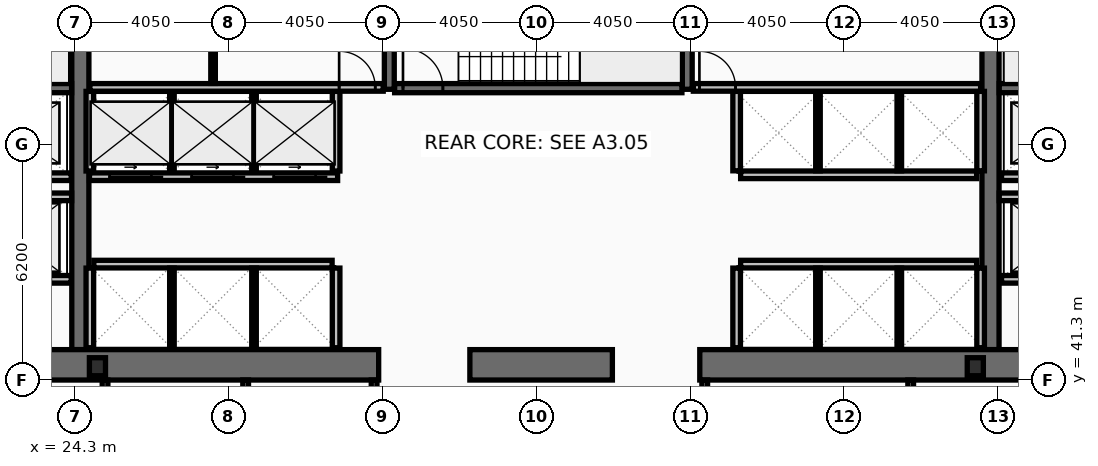
"""IFC4 building model, lengths in metres.
Left out: names, types, materials, properties, quantities, classifications, styles, units other than length and angle.
Written with IfcOpenShell. Run it as: python <this file> out.ifc"""

import sys

from ifc_helpers import new_model, si_unit, direction, frame, frame_2d, origin, origin_2d, place, context, subcontext, project, spatial, rectangle, i_section, extrude, element, fill, save


model = new_model("IFC4")
c1 = context("Model", 3, precision=1e-05, world=origin(), true_north=direction((0.0, 1.0)))
c2 = subcontext(c1, "Body", "Model", "MODEL_VIEW")
j1 = project(units=[si_unit("LENGTHUNIT", "METRE"), si_unit("PLANEANGLEUNIT", "RADIAN")], contexts=[c1])
p1 = place(None, origin())
s1 = spatial("IfcSite", under=j1, at=p1, CompositionType="ELEMENT")
p2 = place(p1, origin())
s2 = spatial("IfcBuilding", under=s1, at=p2, CompositionType="ELEMENT")
p3 = place(p2, frame((0.0, 0.0, 49.8)))
s3 = spatial("IfcBuildingStorey", under=s2, at=p3, CompositionType="ELEMENT", Elevation=49.8)
for number, where, z_axis, x_axis in (
    (1, (24.45, 42.1, 0.0), (0.0, 0.0, 1.0), (0.0, 1.0, 0.0)),
    (2, (48.4, 42.1, 0.0), (0.0, 0.0, 1.0), (0.0, 1.0, 0.0)),
):
    element("IfcWall", number, at=place(p3, frame(where, z_axis=z_axis, x_axis=x_axis)), inside=s3, PredefinedType="SHEAR", context=c2, shape_type="SweptSolid", body=[
        extrude(rectangle(XDim=10.8, YDim=0.45, at=frame_2d((5.4, 0.0))), origin(), (0.0, 0.0, 1.0), 3.82),
    ])
p4 = place(p3, frame((32.3, 41.7, 0.0), z_axis=(0.0, 0.0, 1.0), x_axis=(-1.0, 0.0, 0.0)))
e3 = element("IfcWall", 3, at=p4, inside=s3, PredefinedType="SHEAR", context=c2, shape_type="SweptSolid", body=[
    extrude(rectangle(XDim=11.45, YDim=0.8, at=frame_2d((5.725, 0.0))), origin(), (0.0, 0.0, 1.0), 3.82),
])
p5 = place(p3, frame((38.45, 41.7, 0.0), z_axis=(0.0, 0.0, 1.0), x_axis=(-1.0, 0.0, 0.0)))
e4 = element("IfcWall", 4, at=p5, inside=s3, PredefinedType="SHEAR", context=c2, shape_type="SweptSolid", body=[
    extrude(rectangle(XDim=3.75, YDim=0.8, at=frame_2d((1.875, 0.0))), origin(), (0.0, 0.0, 1.0), 3.82),
])
p6 = place(p3, frame((52.05, 41.7, 0.0), z_axis=(0.0, 0.0, 1.0), x_axis=(-1.0, 0.0, 0.0)))
e5 = element("IfcWall", 5, at=p6, inside=s3, PredefinedType="SHEAR", context=c2, shape_type="SweptSolid", body=[
    extrude(rectangle(XDim=11.3, YDim=0.8, at=frame_2d((5.65, 0.0))), origin(), (0.0, 0.0, 1.0), 3.82),
])
for number, where, z_axis, x_axis in (
    (6, (32.58, 48.95, 0.0), (0.0, 0.0, 1.0), (0.0, 1.0, 0.0)),
    (7, (40.42, 48.95, 0.0), (0.0, 0.0, 1.0), (0.0, 1.0, 0.0)),
):
    element("IfcWall", number, at=place(p3, frame(where, z_axis=z_axis, x_axis=x_axis)), inside=s3, PredefinedType="SHEAR", context=c2, shape_type="SweptSolid", body=[
        extrude(rectangle(XDim=3.95, YDim=0.26, at=frame_2d((1.975, 0.0))), origin(), (0.0, 0.0, 1.0), 3.82),
    ])
p7 = place(p3, frame((17.0, 48.98, 0.0), z_axis=(0.0, 0.0, 1.0), x_axis=(1.0, 0.0, 0.0)))
e8 = element("IfcWall", 8, at=p7, inside=s3, PredefinedType="SHEAR", context=c2, shape_type="SweptSolid", body=[
    extrude(rectangle(XDim=7.22, YDim=0.24, at=frame_2d((3.61, 0.0))), origin(), (0.0, 0.0, 1.0), 3.82),
])
p8 = place(p7, frame((0.22, 0.0, 0.0)))
e9 = element("IfcOpeningElement", 9, at=p8, cuts=e8, PredefinedType="OPENING", context=c2, shape_type="SweptSolid", body=[
    extrude(rectangle(XDim=1.05, YDim=2.15, at=frame_2d((0.525, 1.075))), frame((0.0, 0.13, 0.0), z_axis=(0.0, -1.0, 0.0), x_axis=(1.0, 0.0, 0.0)), (0.0, 0.0, 1.0), 0.26),
])
p9 = place(p3, frame((48.63, 48.98, 0.0), z_axis=(0.0, 0.0, 1.0), x_axis=(1.0, 0.0, 0.0)))
e10 = element("IfcWall", 10, at=p9, inside=s3, PredefinedType="SHEAR", context=c2, shape_type="SweptSolid", body=[
    extrude(rectangle(XDim=7.27, YDim=0.24, at=frame_2d((3.635, 0.0))), origin(), (0.0, 0.0, 1.0), 3.82),
])
p10 = place(p9, frame((6.0, 0.0, 0.0)))
e11 = element("IfcOpeningElement", 11, at=p10, cuts=e10, PredefinedType="OPENING", context=c2, shape_type="SweptSolid", body=[
    extrude(rectangle(XDim=1.05, YDim=2.15, at=frame_2d((0.525, 1.075))), frame((0.0, 0.13, 0.0), z_axis=(0.0, -1.0, 0.0), x_axis=(1.0, 0.0, 0.0)), (0.0, 0.0, 1.0), 0.26),
])
p11 = place(p3, frame((32.72, 48.98, 0.0), z_axis=(0.0, 0.0, 1.0), x_axis=(1.0, 0.0, 0.0)))
e12 = element("IfcWall", 12, at=p11, inside=s3, PredefinedType="SHEAR", context=c2, shape_type="SweptSolid", body=[
    extrude(rectangle(XDim=7.56, YDim=0.24, at=frame_2d((3.78, 0.0))), origin(), (0.0, 0.0, 1.0), 3.82),
])
p12 = place(p11, frame((0.22, 0.0, 0.0)))
e13 = element("IfcOpeningElement", 13, at=p12, cuts=e12, PredefinedType="OPENING", context=c2, shape_type="SweptSolid", body=[
    extrude(rectangle(XDim=1.05, YDim=2.15, at=frame_2d((0.525, 1.075))), frame((0.0, 0.13, 0.0), z_axis=(0.0, -1.0, 0.0), x_axis=(1.0, 0.0, 0.0)), (0.0, 0.0, 1.0), 0.26),
])
for number, where, z_axis, x_axis in (
    (14, (24.9, 41.65, 0.0), (0.0, 0.0, 1.0), (1.0, 0.0, 0.0)),
    (15, (48.0, 41.65, 0.0), (0.0, 0.0, 1.0), (1.0, 0.0, 0.0)),
):
    element("IfcColumn", number, at=place(p3, frame(where, z_axis=z_axis, x_axis=x_axis)), inside=s3, PredefinedType="COLUMN", context=c2, shape_type="SweptSolid", body=[
        extrude(i_section(OverallWidth=0.424, OverallDepth=0.474, WebThickness=0.048, FlangeThickness=0.077, at=origin_2d()), origin(), (0.0, 0.0, 1.0), 4.0),
    ])
p13 = place(p3, frame((51.61, 43.95, 0.0), z_axis=(0.0, 0.0, 1.0), x_axis=(-1.0, 0.0, 0.0)))
e16 = element("IfcWall", 16, at=p13, inside=s3, PredefinedType="PARTITIONING", context=c2, shape_type="SweptSolid", body=[
    extrude(rectangle(XDim=2.92, YDim=0.2, at=frame_2d((1.46, 0.0))), origin(), (0.0, 0.0, 1.0), 3.82),
])
p14 = place(p13, frame((0.81, 0.0, 0.0)))
e17 = element("IfcOpeningElement", 17, at=p14, cuts=e16, PredefinedType="OPENING", context=c2, shape_type="SweptSolid", body=[
    extrude(rectangle(XDim=1.3, YDim=2.18, at=frame_2d((0.65, 1.09))), frame((0.0, 0.11, 0.0), z_axis=(0.0, -1.0, 0.0), x_axis=(1.0, 0.0, 0.0)), (0.0, 0.0, 1.0), 0.22),
])
p15 = place(p3, frame((24.21, 43.95, 0.0), z_axis=(0.0, 0.0, 1.0), x_axis=(-1.0, 0.0, 0.0)))
e18 = element("IfcWall", 18, at=p15, inside=s3, PredefinedType="PARTITIONING", context=c2, shape_type="SweptSolid", body=[
    extrude(rectangle(XDim=2.97, YDim=0.2, at=frame_2d((1.485, 0.0))), origin(), (0.0, 0.0, 1.0), 3.82),
])
p16 = place(p15, frame((0.86, 0.0, 0.0)))
e19 = element("IfcOpeningElement", 19, at=p16, cuts=e18, PredefinedType="OPENING", context=c2, shape_type="SweptSolid", body=[
    extrude(rectangle(XDim=1.3, YDim=2.18, at=frame_2d((0.65, 1.09))), frame((0.0, 0.11, 0.0), z_axis=(0.0, -1.0, 0.0), x_axis=(1.0, 0.0, 0.0)), (0.0, 0.0, 1.0), 0.22),
])
p17 = place(p3, frame((51.61, 46.65, 0.0), z_axis=(0.0, 0.0, 1.0), x_axis=(-1.0, 0.0, 0.0)))
e20 = element("IfcWall", 20, at=p17, inside=s3, PredefinedType="PARTITIONING", context=c2, shape_type="SweptSolid", body=[
    extrude(rectangle(XDim=2.92, YDim=0.2, at=frame_2d((1.46, 0.0))), origin(), (0.0, 0.0, 1.0), 3.82),
])
p18 = place(p17, frame((0.86, 0.0, 0.0)))
e21 = element("IfcOpeningElement", 21, at=p18, cuts=e20, PredefinedType="OPENING", context=c2, shape_type="SweptSolid", body=[
    extrude(rectangle(XDim=1.2, YDim=2.18, at=frame_2d((0.6, 1.09))), frame((0.0, 0.11, 0.0), z_axis=(0.0, -1.0, 0.0), x_axis=(1.0, 0.0, 0.0)), (0.0, 0.0, 1.0), 0.22),
])
p19 = place(p3, frame((24.21, 46.65, 0.0), z_axis=(0.0, 0.0, 1.0), x_axis=(-1.0, 0.0, 0.0)))
e22 = element("IfcWall", 22, at=p19, inside=s3, PredefinedType="PARTITIONING", context=c2, shape_type="SweptSolid", body=[
    extrude(rectangle(XDim=2.97, YDim=0.2, at=frame_2d((1.485, 0.0))), origin(), (0.0, 0.0, 1.0), 3.82),
])
p20 = place(p19, frame((0.91, 0.0, 0.0)))
e23 = element("IfcOpeningElement", 23, at=p20, cuts=e22, PredefinedType="OPENING", context=c2, shape_type="SweptSolid", body=[
    extrude(rectangle(XDim=1.2, YDim=2.18, at=frame_2d((0.6, 1.09))), frame((0.0, 0.11, 0.0), z_axis=(0.0, -1.0, 0.0), x_axis=(1.0, 0.0, 0.0)), (0.0, 0.0, 1.0), 0.22),
])
p21 = place(p3, frame((31.22, 46.65, 0.0), z_axis=(0.0, 0.0, 1.0), x_axis=(-1.0, 0.0, 0.0)))
e24 = element("IfcWall", 24, at=p21, inside=s3, PredefinedType="PARTITIONING", context=c2, shape_type="SweptSolid", body=[
    extrude(rectangle(XDim=6.53, YDim=0.2, at=frame_2d((3.265, 0.0))), origin(), (0.0, 0.0, 1.0), 3.82),
])
p22 = place(p21, frame((4.9, 0.0, 0.0)))
e25 = element("IfcOpeningElement", 25, at=p22, cuts=e24, PredefinedType="OPENING", context=c2, shape_type="SweptSolid", body=[
    extrude(rectangle(XDim=1.1, YDim=2.18, at=frame_2d((0.55, 1.09))), frame((0.0, 0.11, 0.0), z_axis=(0.0, -1.0, 0.0), x_axis=(1.0, 0.0, 0.0)), (0.0, 0.0, 1.0), 0.22),
])
p23 = place(p21, frame((2.74, 0.0, 0.0)))
e26 = element("IfcOpeningElement", 26, at=p23, cuts=e24, PredefinedType="OPENING", context=c2, shape_type="SweptSolid", body=[
    extrude(rectangle(XDim=1.1, YDim=2.18, at=frame_2d((0.55, 1.09))), frame((0.0, 0.11, 0.0), z_axis=(0.0, -1.0, 0.0), x_axis=(1.0, 0.0, 0.0)), (0.0, 0.0, 1.0), 0.22),
])
p24 = place(p21, frame((0.58, 0.0, 0.0)))
e27 = element("IfcOpeningElement", 27, at=p24, cuts=e24, PredefinedType="OPENING", context=c2, shape_type="SweptSolid", body=[
    extrude(rectangle(XDim=1.1, YDim=2.18, at=frame_2d((0.55, 1.09))), frame((0.0, 0.11, 0.0), z_axis=(0.0, -1.0, 0.0), x_axis=(1.0, 0.0, 0.0)), (0.0, 0.0, 1.0), 0.22),
])
p25 = place(p3, frame((21.2, 46.12, 0.0), z_axis=(0.0, 0.0, 1.0), x_axis=(1.0, 0.0, 0.0)))
e28 = element("IfcWall", 28, at=p25, inside=s3, PredefinedType="PARTITIONING", context=c2, shape_type="SweptSolid", body=[
    extrude(rectangle(XDim=3.02, YDim=0.2, at=frame_2d((1.51, 0.0))), origin(), (0.0, 0.0, 1.0), 3.82),
])
p26 = place(p3, frame((48.63, 46.12, 0.0), z_axis=(0.0, 0.0, 1.0), x_axis=(1.0, 0.0, 0.0)))
e29 = element("IfcWall", 29, at=p26, inside=s3, PredefinedType="PARTITIONING", context=c2, shape_type="SweptSolid", body=[
    extrude(rectangle(XDim=3.07, YDim=0.2, at=frame_2d((1.535, 0.0))), origin(), (0.0, 0.0, 1.0), 3.82),
])
for number, where, z_axis, x_axis in (
    (30, (24.7, 46.8, 0.0), (0.0, 0.0, 1.0), (0.0, 1.0, 0.0)),
    (31, (31.18, 46.8, 0.0), (0.0, 0.0, 1.0), (0.0, 1.0, 0.0)),
):
    element("IfcWall", number, at=place(p3, frame(where, z_axis=z_axis, x_axis=x_axis)), inside=s3, PredefinedType="PARTITIONING", context=c2, shape_type="SweptSolid", body=[
        extrude(rectangle(XDim=2.095, YDim=0.2, at=frame_2d((1.047, 0.0))), origin(), (0.0, 0.0, 1.0), 3.82),
    ])
for number, where, z_axis, x_axis in (
    (32, (26.86, 46.8, 0.0), (0.0, 0.0, 1.0), (0.0, 1.0, 0.0)),
    (33, (29.02, 46.8, 0.0), (0.0, 0.0, 1.0), (0.0, 1.0, 0.0)),
):
    element("IfcWall", number, at=place(p3, frame(where, z_axis=z_axis, x_axis=x_axis)), inside=s3, PredefinedType="PARTITIONING", context=c2, shape_type="SweptSolid", body=[
        extrude(rectangle(XDim=2.095, YDim=0.12, at=frame_2d((1.047, 0.0))), origin(), (0.0, 0.0, 1.0), 3.82),
    ])
p27 = place(p3, frame((24.805, 44.35, 0.0), z_axis=(0.0, 0.0, 1.0), x_axis=(1.0, 0.0, 0.0)))
e34 = element("IfcWall", 34, at=p27, inside=s3, PredefinedType="PARTITIONING", context=c2, shape_type="SweptSolid", body=[
    extrude(rectangle(XDim=6.27, YDim=0.2, at=frame_2d((3.135, 0.0))), origin(), (0.0, 0.0, 1.0), 3.82),
])
for number, where, z_axis, x_axis in (
    (35, (24.7, 42.15, 0.0), (0.0, 0.0, 1.0), (0.0, 1.0, 0.0)),
    (36, (31.18, 42.15, 0.0), (0.0, 0.0, 1.0), (0.0, 1.0, 0.0)),
):
    element("IfcWall", number, at=place(p3, frame(where, z_axis=z_axis, x_axis=x_axis)), inside=s3, PredefinedType="PARTITIONING", context=c2, shape_type="SweptSolid", body=[
        extrude(rectangle(XDim=2.095, YDim=0.2, at=frame_2d((1.048, 0.0))), origin(), (0.0, 0.0, 1.0), 3.82),
    ])
for number, where, z_axis, x_axis in (
    (37, (26.86, 42.15, 0.0), (0.0, 0.0, 1.0), (0.0, 1.0, 0.0)),
    (38, (29.02, 42.15, 0.0), (0.0, 0.0, 1.0), (0.0, 1.0, 0.0)),
):
    element("IfcWall", number, at=place(p3, frame(where, z_axis=z_axis, x_axis=x_axis)), inside=s3, PredefinedType="PARTITIONING", context=c2, shape_type="SweptSolid", body=[
        extrude(rectangle(XDim=2.095, YDim=0.12, at=frame_2d((1.048, 0.0))), origin(), (0.0, 0.0, 1.0), 3.82),
    ])
p28 = place(p3, frame((41.825, 46.7, 0.0), z_axis=(0.0, 0.0, 1.0), x_axis=(1.0, 0.0, 0.0)))
e39 = element("IfcWall", 39, at=p28, inside=s3, PredefinedType="PARTITIONING", context=c2, shape_type="SweptSolid", body=[
    extrude(rectangle(XDim=6.21, YDim=0.2, at=frame_2d((3.105, 0.0))), origin(), (0.0, 0.0, 1.0), 3.82),
])
for number, where, z_axis, x_axis in (
    (40, (41.72, 46.805, 0.0), (0.0, 0.0, 1.0), (0.0, 1.0, 0.0)),
    (41, (48.14, 46.805, 0.0), (0.0, 0.0, 1.0), (0.0, 1.0, 0.0)),
):
    element("IfcWall", number, at=place(p3, frame(where, z_axis=z_axis, x_axis=x_axis)), inside=s3, PredefinedType="PARTITIONING", context=c2, shape_type="SweptSolid", body=[
        extrude(rectangle(XDim=2.09, YDim=0.2, at=frame_2d((1.045, 0.0))), origin(), (0.0, 0.0, 1.0), 3.82),
    ])
for number, where, z_axis, x_axis in (
    (42, (43.86, 46.805, 0.0), (0.0, 0.0, 1.0), (0.0, 1.0, 0.0)),
    (43, (46.0, 46.805, 0.0), (0.0, 0.0, 1.0), (0.0, 1.0, 0.0)),
):
    element("IfcWall", number, at=place(p3, frame(where, z_axis=z_axis, x_axis=x_axis)), inside=s3, PredefinedType="PARTITIONING", context=c2, shape_type="SweptSolid", body=[
        extrude(rectangle(XDim=2.09, YDim=0.12, at=frame_2d((1.045, 0.0))), origin(), (0.0, 0.0, 1.0), 3.82),
    ])
p29 = place(p3, frame((41.825, 44.35, 0.0), z_axis=(0.0, 0.0, 1.0), x_axis=(1.0, 0.0, 0.0)))
e44 = element("IfcWall", 44, at=p29, inside=s3, PredefinedType="PARTITIONING", context=c2, shape_type="SweptSolid", body=[
    extrude(rectangle(XDim=6.21, YDim=0.2, at=frame_2d((3.105, 0.0))), origin(), (0.0, 0.0, 1.0), 3.82),
])
for number, where, z_axis, x_axis in (
    (45, (41.72, 42.15, 0.0), (0.0, 0.0, 1.0), (0.0, 1.0, 0.0)),
    (46, (48.14, 42.15, 0.0), (0.0, 0.0, 1.0), (0.0, 1.0, 0.0)),
):
    element("IfcWall", number, at=place(p3, frame(where, z_axis=z_axis, x_axis=x_axis)), inside=s3, PredefinedType="PARTITIONING", context=c2, shape_type="SweptSolid", body=[
        extrude(rectangle(XDim=2.095, YDim=0.2, at=frame_2d((1.048, 0.0))), origin(), (0.0, 0.0, 1.0), 3.82),
    ])
for number, where, z_axis, x_axis in (
    (47, (43.86, 42.15, 0.0), (0.0, 0.0, 1.0), (0.0, 1.0, 0.0)),
    (48, (46.0, 42.15, 0.0), (0.0, 0.0, 1.0), (0.0, 1.0, 0.0)),
):
    element("IfcWall", number, at=place(p3, frame(where, z_axis=z_axis, x_axis=x_axis)), inside=s3, PredefinedType="PARTITIONING", context=c2, shape_type="SweptSolid", body=[
        extrude(rectangle(XDim=2.095, YDim=0.12, at=frame_2d((1.048, 0.0))), origin(), (0.0, 0.0, 1.0), 3.82),
    ])
p30 = place(p3, frame((24.7, 49.0, 0.0), z_axis=(0.0, 0.0, 1.0), x_axis=(1.0, 0.0, 0.0)))
e49 = element("IfcWall", 49, at=p30, inside=s3, PredefinedType="PARTITIONING", context=c2, shape_type="SweptSolid", body=[
    extrude(rectangle(XDim=7.72, YDim=0.2, at=frame_2d((3.86, 0.0))), origin(), (0.0, 0.0, 1.0), 3.82),
])
p31 = place(p30, frame((6.56, 0.0, 0.0)))
e50 = element("IfcOpeningElement", 50, at=p31, cuts=e49, PredefinedType="OPENING", context=c2, shape_type="SweptSolid", body=[
    extrude(rectangle(XDim=0.95, YDim=2.1, at=frame_2d((0.475, 1.05))), frame((0.0, 0.11, 0.0), z_axis=(0.0, -1.0, 0.0), x_axis=(1.0, 0.0, 0.0)), (0.0, 0.0, 1.0), 0.22),
])
p32 = place(p3, frame((27.942, 49.105, 0.0), z_axis=(0.0, 0.0, 1.0), x_axis=(0.0, 1.0, 0.0)))
e51 = element("IfcWall", 51, at=p32, inside=s3, PredefinedType="PARTITIONING", context=c2, shape_type="SweptSolid", body=[
    extrude(rectangle(XDim=3.69, YDim=0.12, at=frame_2d((1.845, 0.0))), origin(), (0.0, 0.0, 1.0), 3.82),
])
p33 = place(p32, frame((1.05, 0.0, 0.0)))
e52 = element("IfcOpeningElement", 52, at=p33, cuts=e51, PredefinedType="OPENING", context=c2, shape_type="SweptSolid", body=[
    extrude(rectangle(XDim=0.9, YDim=2.05, at=frame_2d((0.45, 1.025))), frame((0.0, 0.07, 0.0), z_axis=(0.0, -1.0, 0.0), x_axis=(1.0, 0.0, 0.0)), (0.0, 0.0, 1.0), 0.14),
])
p34 = place(p3, frame((40.58, 49.0, 0.0), z_axis=(0.0, 0.0, 1.0), x_axis=(1.0, 0.0, 0.0)))
e53 = element("IfcWall", 53, at=p34, inside=s3, PredefinedType="PARTITIONING", context=c2, shape_type="SweptSolid", body=[
    extrude(rectangle(XDim=7.56, YDim=0.2, at=frame_2d((3.78, 0.0))), origin(), (0.0, 0.0, 1.0), 3.82),
])
p35 = place(p34, frame((0.16, 0.0, 0.0)))
e54 = element("IfcOpeningElement", 54, at=p35, cuts=e53, PredefinedType="OPENING", context=c2, shape_type="SweptSolid", body=[
    extrude(rectangle(XDim=0.95, YDim=2.1, at=frame_2d((0.475, 1.05))), frame((0.0, 0.11, 0.0), z_axis=(0.0, -1.0, 0.0), x_axis=(1.0, 0.0, 0.0)), (0.0, 0.0, 1.0), 0.22),
])
p36 = place(p3, frame((25.1, 38.28, 0.0), z_axis=(0.0, 0.0, 1.0), x_axis=(0.0, 1.0, 0.0)))
e55 = element("IfcWall", 55, at=p36, inside=s3, PredefinedType="PARTITIONING", context=c2, shape_type="SweptSolid", body=[
    extrude(rectangle(XDim=3.02, YDim=0.15, at=frame_2d((1.51, 0.0))), origin(), (0.0, 0.0, 1.0), 3.01),
])
for number, where, z_axis, x_axis in (
    (56, (28.8, 38.28, 0.0), (0.0, 0.0, 1.0), (0.0, 1.0, 0.0)),
    (57, (32.18, 38.28, 0.0), (0.0, 0.0, 1.0), (0.0, 1.0, 0.0)),
    (58, (40.88, 38.28, 0.0), (0.0, 0.0, 1.0), (0.0, 1.0, 0.0)),
    (59, (46.3, 38.28, 0.0), (0.0, 0.0, 1.0), (0.0, 1.0, 0.0)),
):
    element("IfcWall", number, at=place(p3, frame(where, z_axis=z_axis, x_axis=x_axis)), inside=s3, PredefinedType="PARTITIONING", context=c2, shape_type="SweptSolid", body=[
        extrude(rectangle(XDim=3.02, YDim=0.15, at=frame_2d((1.51, 0.0))), origin(), (0.0, 0.0, 1.0), 3.82),
    ])
p37 = place(p12, origin())
e60 = element("IfcDoor", 60, at=p37, inside=s3, OperationType="SINGLE_SWING_LEFT", PredefinedType="DOOR", context=c2, shape_type="SweptSolid", body=[
    extrude(rectangle(XDim=1.05, YDim=2.15, at=frame_2d((0.525, 1.075))), frame((0.0, 0.025, 0.0), z_axis=(0.0, -1.0, 0.0), x_axis=(1.0, 0.0, 0.0)), (0.0, 0.0, 1.0), 0.05),
])
fill(e13, e60)
p38 = place(p22, origin())
e61 = element("IfcDoor", 61, at=p38, inside=s3, OperationType="SLIDING_TO_LEFT", PredefinedType="DOOR", context=c2, shape_type="SweptSolid", body=[
    extrude(rectangle(XDim=1.1, YDim=2.18, at=frame_2d((0.55, 1.09))), frame((0.0, 0.025, 0.0), z_axis=(0.0, -1.0, 0.0), x_axis=(1.0, 0.0, 0.0)), (0.0, 0.0, 1.0), 0.05),
])
fill(e25, e61)
p39 = place(p23, origin())
e62 = element("IfcDoor", 62, at=p39, inside=s3, OperationType="SLIDING_TO_LEFT", PredefinedType="DOOR", context=c2, shape_type="SweptSolid", body=[
    extrude(rectangle(XDim=1.1, YDim=2.18, at=frame_2d((0.55, 1.09))), frame((0.0, 0.025, 0.0), z_axis=(0.0, -1.0, 0.0), x_axis=(1.0, 0.0, 0.0)), (0.0, 0.0, 1.0), 0.05),
])
fill(e26, e62)
p40 = place(p24, origin())
e63 = element("IfcDoor", 63, at=p40, inside=s3, OperationType="SLIDING_TO_LEFT", PredefinedType="DOOR", context=c2, shape_type="SweptSolid", body=[
    extrude(rectangle(XDim=1.1, YDim=2.18, at=frame_2d((0.55, 1.09))), frame((0.0, 0.025, 0.0), z_axis=(0.0, -1.0, 0.0), x_axis=(1.0, 0.0, 0.0)), (0.0, 0.0, 1.0), 0.05),
])
fill(e27, e63)
p41 = place(p31, origin())
e64 = element("IfcDoor", 64, at=p41, inside=s3, OperationType="SINGLE_SWING_LEFT", PredefinedType="DOOR", context=c2, shape_type="SweptSolid", body=[
    extrude(rectangle(XDim=0.95, YDim=2.1, at=frame_2d((0.475, 1.05))), frame((0.0, 0.025, 0.0), z_axis=(0.0, -1.0, 0.0), x_axis=(1.0, 0.0, 0.0)), (0.0, 0.0, 1.0), 0.05),
])
fill(e50, e64)
p42 = place(p35, origin())
e65 = element("IfcDoor", 65, at=p42, inside=s3, OperationType="SINGLE_SWING_LEFT", PredefinedType="DOOR", context=c2, shape_type="SweptSolid", body=[
    extrude(rectangle(XDim=0.95, YDim=2.1, at=frame_2d((0.475, 1.05))), frame((0.0, 0.025, 0.0), z_axis=(0.0, -1.0, 0.0), x_axis=(1.0, 0.0, 0.0)), (0.0, 0.0, 1.0), 0.05),
])
fill(e54, e65)
save(model, sys.argv[1])
